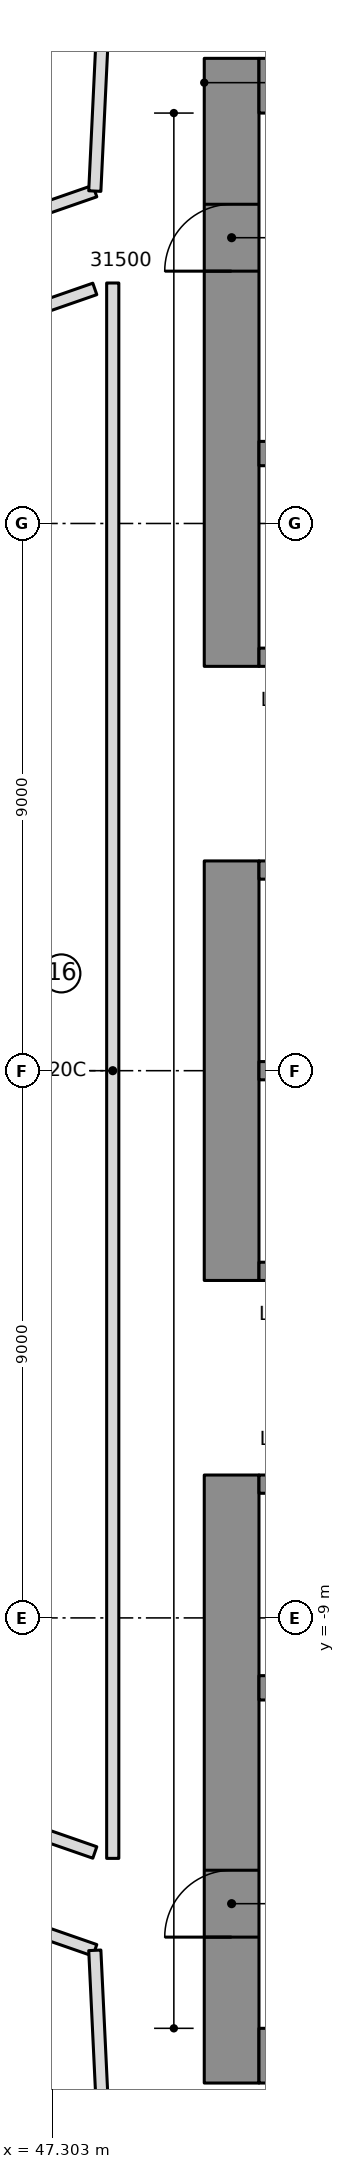
"""IFC4 building model, lengths in metres.
Left out: names, types, materials, properties, quantities, classifications, styles, units other than length and angle.
Written with IfcOpenShell. Run it as: python <this file> out.ifc"""

import sys

from ifc_helpers import new_model, si_unit, direction, frame, frame_2d, origin, place, context, subcontext, project, spatial, rectangle, extrude, element, fill, save


model = new_model("IFC4")
c1 = context("Model", 3, precision=1e-05, world=origin(), true_north=direction((0.0, 1.0)))
c2 = subcontext(c1, "Body", "Model", "MODEL_VIEW")
j1 = project(units=[si_unit("LENGTHUNIT", "METRE"), si_unit("PLANEANGLEUNIT", "RADIAN")], contexts=[c1])
p1 = place(None, origin())
s1 = spatial("IfcSite", under=j1, at=p1, CompositionType="ELEMENT")
p2 = place(p1, origin())
s2 = spatial("IfcBuilding", under=s1, at=p2, CompositionType="ELEMENT")
p3 = place(p2, frame((0.0, 0.0, 151.5)))
s3 = spatial("IfcBuildingStorey", under=s2, at=p3, CompositionType="ELEMENT", Elevation=151.5)
p4 = place(p3, frame((50.25, 6.65, 0.0), z_axis=(0.0, 0.0, 1.0), x_axis=(0.0, 1.0, 0.0)))
e1 = element("IfcWall", 1, at=p4, inside=s3, PredefinedType="SHEAR", context=c2, shape_type="SweptSolid", body=[
    extrude(rectangle(XDim=10.0, YDim=0.9, at=frame_2d((5.0, 0.0))), origin(), (0.0, 0.0, 1.0), 3.55),
])
p5 = place(p4, frame((6.5, 0.0, 0.0)))
e2 = element("IfcOpeningElement", 2, at=p5, cuts=e1, PredefinedType="OPENING", context=c2, shape_type="SweptSolid", body=[
    extrude(rectangle(XDim=1.1, YDim=2.1, at=frame_2d((0.55, 1.05))), frame((0.0, 0.46, 0.0), z_axis=(0.0, -1.0, 0.0), x_axis=(1.0, 0.0, 0.0)), (0.0, 0.0, 1.0), 0.92),
])
p6 = place(p3, frame((50.25, -3.45, 0.0), z_axis=(0.0, 0.0, 1.0), x_axis=(0.0, 1.0, 0.0)))
e3 = element("IfcWall", 3, at=p6, inside=s3, PredefinedType="SHEAR", context=c2, shape_type="SweptSolid", body=[
    extrude(rectangle(XDim=6.9, YDim=0.9, at=frame_2d((3.45, 0.0))), origin(), (0.0, 0.0, 1.0), 3.55),
])
p7 = place(p3, frame((50.25, -16.65, 0.0), z_axis=(0.0, 0.0, 1.0), x_axis=(0.0, 1.0, 0.0)))
e4 = element("IfcWall", 4, at=p7, inside=s3, PredefinedType="SHEAR", context=c2, shape_type="SweptSolid", body=[
    extrude(rectangle(XDim=10.0, YDim=0.9, at=frame_2d((5.0, 0.0))), origin(), (0.0, 0.0, 1.0), 3.55),
])
p8 = place(p7, frame((2.4, 0.0, 0.0)))
e5 = element("IfcOpeningElement", 5, at=p8, cuts=e4, PredefinedType="OPENING", context=c2, shape_type="SweptSolid", body=[
    extrude(rectangle(XDim=1.1, YDim=2.1, at=frame_2d((0.55, 1.05))), frame((0.0, 0.46, 0.0), z_axis=(0.0, -1.0, 0.0), x_axis=(1.0, 0.0, 0.0)), (0.0, 0.0, 1.0), 0.92),
])
for number, where, z_axis, x_axis in (
    (6, (50.7, 16.2, 0.0), (0.0, 0.0, 1.0), (1.0, 0.0, 0.0)),
    (7, (50.7, -16.2, 0.0), (0.0, 0.0, 1.0), (1.0, 0.0, 0.0)),
):
    element("IfcWall", number, at=place(p3, frame(where, z_axis=z_axis, x_axis=x_axis)), inside=s3, PredefinedType="SHEAR", context=c2, shape_type="SweptSolid", body=[
        extrude(rectangle(XDim=13.92, YDim=0.9, at=frame_2d((6.96, 0.0))), origin(), (0.0, 0.0, 1.0), 3.55),
    ])
p9 = place(p3, frame((50.7, 10.15, 0.0), z_axis=(0.0, 0.0, 1.0), x_axis=(1.0, 0.0, 0.0)))
e8 = element("IfcWall", 8, at=p9, inside=s3, PredefinedType="SHEAR", context=c2, shape_type="SweptSolid", body=[
    extrude(rectangle(XDim=13.02, YDim=0.4, at=frame_2d((6.51, 0.0))), origin(), (0.0, 0.0, 1.0), 3.55),
])
p10 = place(p9, frame((0.7, 0.0, 0.0)))
e9 = element("IfcOpeningElement", 9, at=p10, cuts=e8, PredefinedType="OPENING", context=c2, shape_type="SweptSolid", body=[
    extrude(rectangle(XDim=1.1, YDim=2.1, at=frame_2d((0.55, 1.05))), frame((0.0, 0.21, 0.0), z_axis=(0.0, -1.0, 0.0), x_axis=(1.0, 0.0, 0.0)), (0.0, 0.0, 1.0), 0.42),
])
p11 = place(p9, frame((3.5, 0.0, 0.0)))
e10 = element("IfcOpeningElement", 10, at=p11, cuts=e8, PredefinedType="OPENING", context=c2, shape_type="SweptSolid", body=[
    extrude(rectangle(XDim=1.1, YDim=2.1, at=frame_2d((0.55, 1.05))), frame((0.0, 0.21, 0.0), z_axis=(0.0, -1.0, 0.0), x_axis=(1.0, 0.0, 0.0)), (0.0, 0.0, 1.0), 0.42),
])
p12 = place(p3, frame((50.7, -10.15, 0.0), z_axis=(0.0, 0.0, 1.0), x_axis=(1.0, 0.0, 0.0)))
e11 = element("IfcWall", 11, at=p12, inside=s3, PredefinedType="SHEAR", context=c2, shape_type="SweptSolid", body=[
    extrude(rectangle(XDim=13.02, YDim=0.4, at=frame_2d((6.51, 0.0))), origin(), (0.0, 0.0, 1.0), 3.55),
])
p13 = place(p3, frame((50.7, 0.0, 0.0), z_axis=(0.0, 0.0, 1.0), x_axis=(1.0, 0.0, 0.0)))
e12 = element("IfcWall", 12, at=p13, inside=s3, PredefinedType="SHEAR", context=c2, shape_type="SweptSolid", body=[
    extrude(rectangle(XDim=10.9, YDim=0.3, at=frame_2d((5.45, 0.0))), origin(), (0.0, 0.0, 1.0), 3.55),
])
p14 = place(p3, frame((50.7, 3.3, 0.0), z_axis=(0.0, 0.0, 1.0), x_axis=(1.0, 0.0, 0.0)))
e13 = element("IfcWall", 13, at=p14, inside=s3, PredefinedType="SHEAR", context=c2, shape_type="SweptSolid", body=[
    extrude(rectangle(XDim=10.9, YDim=0.3, at=frame_2d((5.45, 0.0))), origin(), (0.0, 0.0, 1.0), 3.55),
])
p15 = place(p14, frame((0.8, 0.0, 0.0)))
e14 = element("IfcOpeningElement", 14, at=p15, cuts=e13, PredefinedType="OPENING", context=c2, shape_type="SweptSolid", body=[
    extrude(rectangle(XDim=0.9, YDim=2.1, at=frame_2d((0.45, 1.05))), frame((0.0, 0.16, 0.0), z_axis=(0.0, -1.0, 0.0), x_axis=(1.0, 0.0, 0.0)), (0.0, 0.0, 1.0), 0.32),
])
p16 = place(p14, frame((3.6, 0.0, 0.0)))
e15 = element("IfcOpeningElement", 15, at=p16, cuts=e13, PredefinedType="OPENING", context=c2, shape_type="SweptSolid", body=[
    extrude(rectangle(XDim=0.9, YDim=2.1, at=frame_2d((0.45, 1.05))), frame((0.0, 0.16, 0.0), z_axis=(0.0, -1.0, 0.0), x_axis=(1.0, 0.0, 0.0)), (0.0, 0.0, 1.0), 0.32),
])
p17 = place(p14, frame((6.4, 0.0, 0.0)))
e16 = element("IfcOpeningElement", 16, at=p17, cuts=e13, PredefinedType="OPENING", context=c2, shape_type="SweptSolid", body=[
    extrude(rectangle(XDim=0.9, YDim=2.1, at=frame_2d((0.45, 1.05))), frame((0.0, 0.16, 0.0), z_axis=(0.0, -1.0, 0.0), x_axis=(1.0, 0.0, 0.0)), (0.0, 0.0, 1.0), 0.32),
])
p18 = place(p14, frame((9.2, 0.0, 0.0)))
e17 = element("IfcOpeningElement", 17, at=p18, cuts=e13, PredefinedType="OPENING", context=c2, shape_type="SweptSolid", body=[
    extrude(rectangle(XDim=0.9, YDim=2.1, at=frame_2d((0.45, 1.05))), frame((0.0, 0.16, 0.0), z_axis=(0.0, -1.0, 0.0), x_axis=(1.0, 0.0, 0.0)), (0.0, 0.0, 1.0), 0.32),
])
p19 = place(p3, frame((50.7, 6.8, 0.0), z_axis=(0.0, 0.0, 1.0), x_axis=(1.0, 0.0, 0.0)))
e18 = element("IfcWall", 18, at=p19, inside=s3, PredefinedType="SHEAR", context=c2, shape_type="SweptSolid", body=[
    extrude(rectangle(XDim=10.9, YDim=0.3, at=frame_2d((5.45, 0.0))), origin(), (0.0, 0.0, 1.0), 3.55),
])
p20 = place(p19, frame((6.3, 0.0, 0.0)))
e19 = element("IfcOpeningElement", 19, at=p20, cuts=e18, PredefinedType="OPENING", context=c2, shape_type="SweptSolid", body=[
    extrude(rectangle(XDim=1.1, YDim=2.1, at=frame_2d((0.55, 1.05))), frame((0.0, 0.16, 0.0), z_axis=(0.0, -1.0, 0.0), x_axis=(1.0, 0.0, 0.0)), (0.0, 0.0, 1.0), 0.32),
])
p21 = place(p19, frame((9.1, 0.0, 0.0)))
e20 = element("IfcOpeningElement", 20, at=p21, cuts=e18, PredefinedType="OPENING", context=c2, shape_type="SweptSolid", body=[
    extrude(rectangle(XDim=1.1, YDim=2.1, at=frame_2d((0.55, 1.05))), frame((0.0, 0.16, 0.0), z_axis=(0.0, -1.0, 0.0), x_axis=(1.0, 0.0, 0.0)), (0.0, 0.0, 1.0), 0.32),
])
p22 = place(p3, frame((50.7, -3.3, 0.0), z_axis=(0.0, 0.0, 1.0), x_axis=(1.0, 0.0, 0.0)))
e21 = element("IfcWall", 21, at=p22, inside=s3, PredefinedType="SHEAR", context=c2, shape_type="SweptSolid", body=[
    extrude(rectangle(XDim=10.9, YDim=0.3, at=frame_2d((5.45, 0.0))), origin(), (0.0, 0.0, 1.0), 3.55),
])
p23 = place(p22, frame((9.2, 0.0, 0.0)))
e22 = element("IfcOpeningElement", 22, at=p23, cuts=e21, PredefinedType="OPENING", context=c2, shape_type="SweptSolid", body=[
    extrude(rectangle(XDim=0.9, YDim=2.1, at=frame_2d((0.45, 1.05))), frame((0.0, 0.16, 0.0), z_axis=(0.0, -1.0, 0.0), x_axis=(1.0, 0.0, 0.0)), (0.0, 0.0, 1.0), 0.32),
])
p24 = place(p3, frame((50.7, -6.8, 0.0), z_axis=(0.0, 0.0, 1.0), x_axis=(1.0, 0.0, 0.0)))
e23 = element("IfcWall", 23, at=p24, inside=s3, PredefinedType="SHEAR", context=c2, shape_type="SweptSolid", body=[
    extrude(rectangle(XDim=10.9, YDim=0.3, at=frame_2d((5.45, 0.0))), origin(), (0.0, 0.0, 1.0), 3.55),
])
p25 = place(p24, frame((0.7, 0.0, 0.0)))
e24 = element("IfcOpeningElement", 24, at=p25, cuts=e23, PredefinedType="OPENING", context=c2, shape_type="SweptSolid", body=[
    extrude(rectangle(XDim=1.1, YDim=2.1, at=frame_2d((0.55, 1.05))), frame((0.0, 0.16, 0.0), z_axis=(0.0, -1.0, 0.0), x_axis=(1.0, 0.0, 0.0)), (0.0, 0.0, 1.0), 0.32),
])
p26 = place(p24, frame((3.5, 0.0, 0.0)))
e25 = element("IfcOpeningElement", 25, at=p26, cuts=e23, PredefinedType="OPENING", context=c2, shape_type="SweptSolid", body=[
    extrude(rectangle(XDim=1.1, YDim=2.1, at=frame_2d((0.55, 1.05))), frame((0.0, 0.16, 0.0), z_axis=(0.0, -1.0, 0.0), x_axis=(1.0, 0.0, 0.0)), (0.0, 0.0, 1.0), 0.32),
])
p27 = place(p24, frame((6.3, 0.0, 0.0)))
e26 = element("IfcOpeningElement", 26, at=p27, cuts=e23, PredefinedType="OPENING", context=c2, shape_type="SweptSolid", body=[
    extrude(rectangle(XDim=1.1, YDim=2.1, at=frame_2d((0.55, 1.05))), frame((0.0, 0.16, 0.0), z_axis=(0.0, -1.0, 0.0), x_axis=(1.0, 0.0, 0.0)), (0.0, 0.0, 1.0), 0.32),
])
p28 = place(p24, frame((9.1, 0.0, 0.0)))
e27 = element("IfcOpeningElement", 27, at=p28, cuts=e23, PredefinedType="OPENING", context=c2, shape_type="SweptSolid", body=[
    extrude(rectangle(XDim=1.1, YDim=2.1, at=frame_2d((0.55, 1.05))), frame((0.0, 0.16, 0.0), z_axis=(0.0, -1.0, 0.0), x_axis=(1.0, 0.0, 0.0)), (0.0, 0.0, 1.0), 0.32),
])
for number, where, z_axis, x_axis in (
    (28, (47.22, 14.175, 0.0), (0.0, 0.0, 1.0), (-0.396, 0.918, 0.0)),
    (29, (44.202, -21.172, 0.0), (0.0, 0.0, 1.0), (0.396, 0.918, 0.0)),
):
    element("IfcWall", number, at=place(p3, frame(where, z_axis=z_axis, x_axis=x_axis)), inside=s3, PredefinedType="PARTITIONING", context=c2, shape_type="SweptSolid", body=[
        extrude(rectangle(XDim=7.62, YDim=0.2, at=frame_2d((3.81, 0.0))), origin(), (0.0, 0.0, 1.0), 3.25),
    ])
for number, where, z_axis, x_axis in (
    (30, (48.0, 14.467, 0.0), (0.0, 0.0, 1.0), (-0.945, -0.328, 0.0)),
    (31, (47.212, -14.193, 0.0), (0.0, 0.0, 1.0), (0.945, -0.328, 0.0)),
):
    element("IfcWall", number, at=place(p3, frame(where, z_axis=z_axis, x_axis=x_axis)), inside=s3, PredefinedType="PARTITIONING", context=c2, shape_type="SweptSolid", body=[
        extrude(rectangle(XDim=0.834, YDim=0.2, at=frame_2d((0.417, 0.0))), origin(), (0.0, 0.0, 1.0), 3.25),
    ])
for number, where, z_axis, x_axis in (
    (32, (46.781, 12.434, 0.0), (0.0, 0.0, 1.0), (0.945, 0.328, 0.0)),
    (33, (48.0, -12.858, 0.0), (0.0, 0.0, 1.0), (-0.945, 0.328, 0.0)),
):
    element("IfcWall", number, at=place(p3, frame(where, z_axis=z_axis, x_axis=x_axis)), inside=s3, PredefinedType="PARTITIONING", context=c2, shape_type="SweptSolid", body=[
        extrude(rectangle(XDim=1.29, YDim=0.2, at=frame_2d((0.645, 0.0))), origin(), (0.0, 0.0, 1.0), 3.25),
    ])
p29 = place(p3, frame((48.279, 20.289, 0.0), z_axis=(0.0, 0.0, 1.0), x_axis=(-0.047837808481, -0.998855116661, 0.0)))
e34 = element("IfcWall", 34, at=p29, inside=s3, PredefinedType="PARTITIONING", context=c2, shape_type="SweptSolid", body=[
    extrude(rectangle(XDim=5.828, YDim=0.2, at=frame_2d((2.914, 0.0))), origin(), (0.0, 0.0, 1.0), 3.25),
])
p30 = place(p29, frame((2.414, 0.0, 0.0)))
e35 = element("IfcOpeningElement", 35, at=p30, cuts=e34, PredefinedType="OPENING", context=c2, shape_type="SweptSolid", body=[
    extrude(rectangle(XDim=1.0, YDim=2.1, at=frame_2d((0.5, 1.05))), frame((0.0, 0.11, 0.0), z_axis=(0.0, -1.0, 0.0), x_axis=(1.0, 0.0, 0.0)), (0.0, 0.0, 1.0), 0.22),
])
p31 = place(p3, frame((48.0, -14.467, 0.0), z_axis=(0.0, 0.0, 1.0), x_axis=(0.047837808481, -0.998855116661, 0.0)))
e36 = element("IfcWall", 36, at=p31, inside=s3, PredefinedType="PARTITIONING", context=c2, shape_type="SweptSolid", body=[
    extrude(rectangle(XDim=5.828, YDim=0.2, at=frame_2d((2.914, 0.0))), origin(), (0.0, 0.0, 1.0), 3.25),
])
p32 = place(p31, frame((2.414, 0.0, 0.0)))
e37 = element("IfcOpeningElement", 37, at=p32, cuts=e36, PredefinedType="OPENING", context=c2, shape_type="SweptSolid", body=[
    extrude(rectangle(XDim=1.0, YDim=2.1, at=frame_2d((0.5, 1.05))), frame((0.0, 0.11, 0.0), z_axis=(0.0, -1.0, 0.0), x_axis=(1.0, 0.0, 0.0)), (0.0, 0.0, 1.0), 0.22),
])
p33 = place(p3, frame((48.295, 12.955, 0.0), z_axis=(0.0, 0.0, 1.0), x_axis=(0.0, -1.0, 0.0)))
e38 = element("IfcWall", 38, at=p33, inside=s3, PredefinedType="PARTITIONING", context=c2, shape_type="SweptSolid", body=[
    extrude(rectangle(XDim=25.91, YDim=0.2, at=frame_2d((12.955, 0.0))), origin(), (0.0, 0.0, 1.0), 3.25),
])
p34 = place(p5, origin())
e39 = element("IfcDoor", 39, at=p34, inside=s3, OperationType="SINGLE_SWING_RIGHT", PredefinedType="DOOR", context=c2, shape_type="SweptSolid", body=[
    extrude(rectangle(XDim=1.1, YDim=2.1, at=frame_2d((0.55, 1.05))), frame((0.0, 0.025, 0.0), z_axis=(0.0, -1.0, 0.0), x_axis=(1.0, 0.0, 0.0)), (0.0, 0.0, 1.0), 0.05),
])
fill(e2, e39)
p35 = place(p8, origin())
e40 = element("IfcDoor", 40, at=p35, inside=s3, OperationType="SINGLE_SWING_RIGHT", PredefinedType="DOOR", context=c2, shape_type="SweptSolid", body=[
    extrude(rectangle(XDim=1.1, YDim=2.1, at=frame_2d((0.55, 1.05))), frame((0.0, 0.025, 0.0), z_axis=(0.0, -1.0, 0.0), x_axis=(1.0, 0.0, 0.0)), (0.0, 0.0, 1.0), 0.05),
])
fill(e5, e40)
save(model, sys.argv[1])
